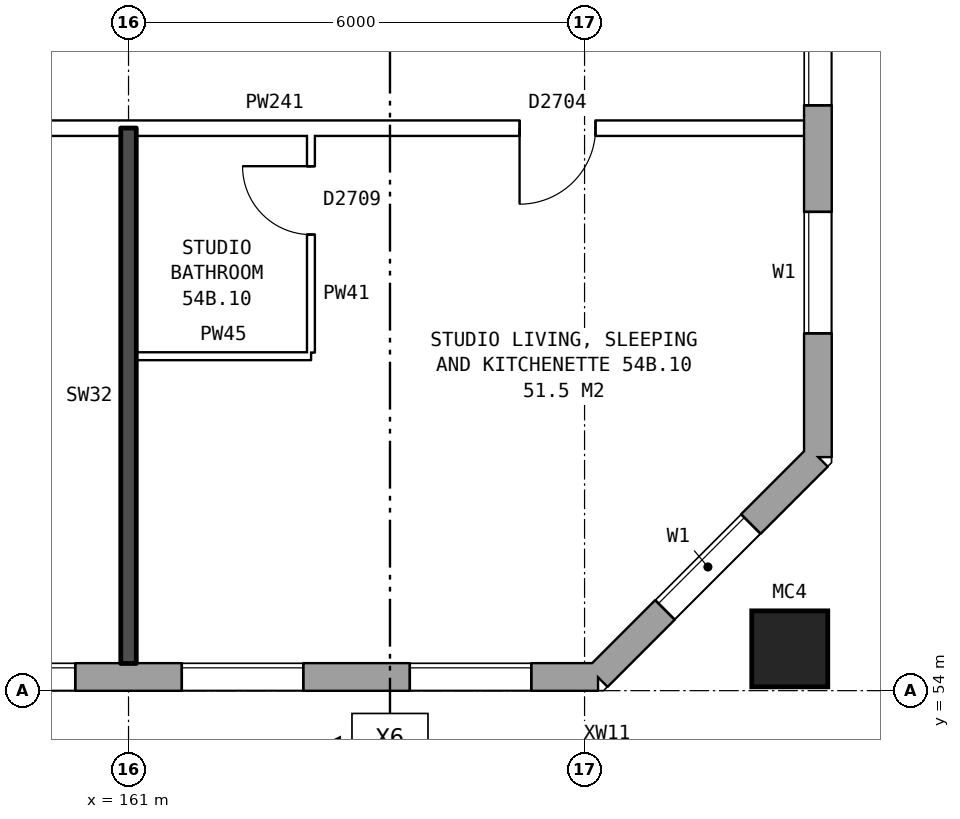
"""IFC4 building model, lengths in metres.
Left out: names, types, materials, properties, quantities, classifications, styles, units other than length and angle.
Written with IfcOpenShell. Run it as: python <this file> out.ifc"""

import sys

from ifc_helpers import new_model, si_unit, direction, frame, frame_2d, origin, origin_2d, place, context, subcontext, project, spatial, rectangle, hollow_rectangle, extrude, element, fill, save


model = new_model("IFC4")
c1 = context("Model", 3, precision=1e-05, world=origin(), true_north=direction((0.0, 1.0)))
c2 = subcontext(c1, "Body", "Model", "MODEL_VIEW")
j1 = project(units=[si_unit("LENGTHUNIT", "METRE"), si_unit("PLANEANGLEUNIT", "RADIAN")], contexts=[c1])
p1 = place(None, origin())
s1 = spatial("IfcSite", under=j1, at=p1, CompositionType="ELEMENT")
p2 = place(p1, origin())
s2 = spatial("IfcBuilding", under=s1, at=p2, CompositionType="ELEMENT")
p3 = place(p2, frame((0.0, 0.0, 191.3)))
s3 = spatial("IfcBuildingStorey", under=s2, at=p3, CompositionType="ELEMENT", Elevation=191.3)
p4 = place(p3, frame((169.7, 54.55, 0.0), z_axis=(0.0, 0.0, 1.0), x_axis=(1.0, 0.0, 0.0)))
e1 = element("IfcColumn", 1, at=p4, inside=s3, PredefinedType="COLUMN", context=c2, shape_type="SweptSolid", body=[
    extrude(hollow_rectangle(XDim=1.0, YDim=1.0, WallThickness=0.055, at=origin_2d()), origin(), (0.0, 0.0, 1.0), 3.1),
])
p5 = place(p3, frame((134.075, 54.18, 0.0), z_axis=(0.0, 0.0, 1.0), x_axis=(1.0, 0.0, 0.0)))
e2 = element("IfcWall", 2, at=p5, inside=s3, PredefinedType="STANDARD", context=c2, shape_type="SweptSolid", body=[
    extrude(rectangle(XDim=33.101, YDim=0.36, at=frame_2d((16.55, 0.0))), origin(), (0.0, 0.0, 1.0), 2.85),
])
p6 = place(p5, frame((0.625, 0.0, 0.8)))
e3 = element("IfcOpeningElement", 3, at=p6, cuts=e2, PredefinedType="OPENING", context=c2, shape_type="SweptSolid", body=[
    extrude(rectangle(XDim=1.6, YDim=1.8, at=frame_2d((0.8, 0.9))), frame((0.0, 0.19, 0.0), z_axis=(0.0, -1.0, 0.0), x_axis=(1.0, 0.0, 0.0)), (0.0, 0.0, 1.0), 0.38),
])
p7 = place(p5, frame((3.625, 0.0, 0.8)))
e4 = element("IfcOpeningElement", 4, at=p7, cuts=e2, PredefinedType="OPENING", context=c2, shape_type="SweptSolid", body=[
    extrude(rectangle(XDim=1.6, YDim=1.8, at=frame_2d((0.8, 0.9))), frame((0.0, 0.19, 0.0), z_axis=(0.0, -1.0, 0.0), x_axis=(1.0, 0.0, 0.0)), (0.0, 0.0, 1.0), 0.38),
])
p8 = place(p5, frame((6.625, 0.0, 0.8)))
e5 = element("IfcOpeningElement", 5, at=p8, cuts=e2, PredefinedType="OPENING", context=c2, shape_type="SweptSolid", body=[
    extrude(rectangle(XDim=1.6, YDim=1.8, at=frame_2d((0.8, 0.9))), frame((0.0, 0.19, 0.0), z_axis=(0.0, -1.0, 0.0), x_axis=(1.0, 0.0, 0.0)), (0.0, 0.0, 1.0), 0.38),
])
p9 = place(p5, frame((9.625, 0.0, 0.8)))
e6 = element("IfcOpeningElement", 6, at=p9, cuts=e2, PredefinedType="OPENING", context=c2, shape_type="SweptSolid", body=[
    extrude(rectangle(XDim=1.6, YDim=1.8, at=frame_2d((0.8, 0.9))), frame((0.0, 0.19, 0.0), z_axis=(0.0, -1.0, 0.0), x_axis=(1.0, 0.0, 0.0)), (0.0, 0.0, 1.0), 0.38),
])
p10 = place(p5, frame((12.625, 0.0, 0.8)))
e7 = element("IfcOpeningElement", 7, at=p10, cuts=e2, PredefinedType="OPENING", context=c2, shape_type="SweptSolid", body=[
    extrude(rectangle(XDim=1.6, YDim=1.8, at=frame_2d((0.8, 0.9))), frame((0.0, 0.19, 0.0), z_axis=(0.0, -1.0, 0.0), x_axis=(1.0, 0.0, 0.0)), (0.0, 0.0, 1.0), 0.38),
])
p11 = place(p5, frame((15.925, 0.0, 0.15)))
e8 = element("IfcOpeningElement", 8, at=p11, cuts=e2, PredefinedType="OPENING", context=c2, shape_type="SweptSolid", body=[
    extrude(rectangle(XDim=1.2, YDim=1.2, at=frame_2d((0.6, 0.6))), frame((0.0, 0.19, 0.0), z_axis=(0.0, -1.0, 0.0), x_axis=(1.0, 0.0, 0.0)), (0.0, 0.0, 1.0), 0.38),
])
p12 = place(p5, frame((18.625, 0.0, 0.8)))
e9 = element("IfcOpeningElement", 9, at=p12, cuts=e2, PredefinedType="OPENING", context=c2, shape_type="SweptSolid", body=[
    extrude(rectangle(XDim=1.6, YDim=1.8, at=frame_2d((0.8, 0.9))), frame((0.0, 0.19, 0.0), z_axis=(0.0, -1.0, 0.0), x_axis=(1.0, 0.0, 0.0)), (0.0, 0.0, 1.0), 0.38),
])
p13 = place(p5, frame((21.625, 0.0, 0.8)))
e10 = element("IfcOpeningElement", 10, at=p13, cuts=e2, PredefinedType="OPENING", context=c2, shape_type="SweptSolid", body=[
    extrude(rectangle(XDim=1.6, YDim=1.8, at=frame_2d((0.8, 0.9))), frame((0.0, 0.19, 0.0), z_axis=(0.0, -1.0, 0.0), x_axis=(1.0, 0.0, 0.0)), (0.0, 0.0, 1.0), 0.38),
])
p14 = place(p5, frame((24.625, 0.0, 0.8)))
e11 = element("IfcOpeningElement", 11, at=p14, cuts=e2, PredefinedType="OPENING", context=c2, shape_type="SweptSolid", body=[
    extrude(rectangle(XDim=1.6, YDim=1.8, at=frame_2d((0.8, 0.9))), frame((0.0, 0.19, 0.0), z_axis=(0.0, -1.0, 0.0), x_axis=(1.0, 0.0, 0.0)), (0.0, 0.0, 1.0), 0.38),
])
p15 = place(p5, frame((27.625, 0.0, 0.8)))
e12 = element("IfcOpeningElement", 12, at=p15, cuts=e2, PredefinedType="OPENING", context=c2, shape_type="SweptSolid", body=[
    extrude(rectangle(XDim=1.6, YDim=1.8, at=frame_2d((0.8, 0.9))), frame((0.0, 0.19, 0.0), z_axis=(0.0, -1.0, 0.0), x_axis=(1.0, 0.0, 0.0)), (0.0, 0.0, 1.0), 0.38),
])
p16 = place(p5, frame((30.625, 0.0, 0.8)))
e13 = element("IfcOpeningElement", 13, at=p16, cuts=e2, PredefinedType="OPENING", context=c2, shape_type="SweptSolid", body=[
    extrude(rectangle(XDim=1.6, YDim=1.8, at=frame_2d((0.8, 0.9))), frame((0.0, 0.19, 0.0), z_axis=(0.0, -1.0, 0.0), x_axis=(1.0, 0.0, 0.0)), (0.0, 0.0, 1.0), 0.38),
])
p17 = place(p3, frame((167.175, 54.18, 0.0), z_axis=(0.0, 0.0, 1.0), x_axis=(0.707106781187, 0.707106781187, 0.0)))
e14 = element("IfcWall", 14, at=p17, inside=s3, PredefinedType="STANDARD", context=c2, shape_type="SweptSolid", body=[
    extrude(rectangle(XDim=4.094, YDim=0.36, at=frame_2d((2.047, 0.0))), origin(), (0.0, 0.0, 1.0), 2.85),
])
p18 = place(p17, frame((1.247, 0.0, 0.8)))
e15 = element("IfcOpeningElement", 15, at=p18, cuts=e14, PredefinedType="OPENING", context=c2, shape_type="SweptSolid", body=[
    extrude(rectangle(XDim=1.6, YDim=1.8, at=frame_2d((0.8, 0.9))), frame((0.0, 0.19, 0.0), z_axis=(0.0, -1.0, 0.0), x_axis=(1.0, 0.0, 0.0)), (0.0, 0.0, 1.0), 0.38),
])
p19 = place(p3, frame((170.07, 57.075, 0.0), z_axis=(0.0, 0.0, 1.0), x_axis=(0.0, 1.0, 0.0)))
e16 = element("IfcWall", 16, at=p19, inside=s3, PredefinedType="STANDARD", context=c2, shape_type="SweptSolid", body=[
    extrude(rectangle(XDim=25.851, YDim=0.36, at=frame_2d((12.925, 0.0))), origin(), (0.0, 0.0, 1.0), 2.85),
])
p20 = place(p19, frame((1.625, 0.0, 0.8)))
e17 = element("IfcOpeningElement", 17, at=p20, cuts=e16, PredefinedType="OPENING", context=c2, shape_type="SweptSolid", body=[
    extrude(rectangle(XDim=1.6, YDim=1.8, at=frame_2d((0.8, 0.9))), frame((0.0, 0.19, 0.0), z_axis=(0.0, -1.0, 0.0), x_axis=(1.0, 0.0, 0.0)), (0.0, 0.0, 1.0), 0.38),
])
p21 = place(p19, frame((4.625, 0.0, 0.8)))
e18 = element("IfcOpeningElement", 18, at=p21, cuts=e16, PredefinedType="OPENING", context=c2, shape_type="SweptSolid", body=[
    extrude(rectangle(XDim=1.6, YDim=1.8, at=frame_2d((0.8, 0.9))), frame((0.0, 0.19, 0.0), z_axis=(0.0, -1.0, 0.0), x_axis=(1.0, 0.0, 0.0)), (0.0, 0.0, 1.0), 0.38),
])
p22 = place(p19, frame((7.625, 0.0, 0.8)))
e19 = element("IfcOpeningElement", 19, at=p22, cuts=e16, PredefinedType="OPENING", context=c2, shape_type="SweptSolid", body=[
    extrude(rectangle(XDim=1.6, YDim=1.8, at=frame_2d((0.8, 0.9))), frame((0.0, 0.19, 0.0), z_axis=(0.0, -1.0, 0.0), x_axis=(1.0, 0.0, 0.0)), (0.0, 0.0, 1.0), 0.38),
])
p23 = place(p19, frame((10.625, 0.0, 0.8)))
e20 = element("IfcOpeningElement", 20, at=p23, cuts=e16, PredefinedType="OPENING", context=c2, shape_type="SweptSolid", body=[
    extrude(rectangle(XDim=1.6, YDim=1.8, at=frame_2d((0.8, 0.9))), frame((0.0, 0.19, 0.0), z_axis=(0.0, -1.0, 0.0), x_axis=(1.0, 0.0, 0.0)), (0.0, 0.0, 1.0), 0.38),
])
p24 = place(p19, frame((13.625, 0.0, 0.8)))
e21 = element("IfcOpeningElement", 21, at=p24, cuts=e16, PredefinedType="OPENING", context=c2, shape_type="SweptSolid", body=[
    extrude(rectangle(XDim=1.6, YDim=1.8, at=frame_2d((0.8, 0.9))), frame((0.0, 0.19, 0.0), z_axis=(0.0, -1.0, 0.0), x_axis=(1.0, 0.0, 0.0)), (0.0, 0.0, 1.0), 0.38),
])
p25 = place(p19, frame((16.625, 0.0, 0.8)))
e22 = element("IfcOpeningElement", 22, at=p25, cuts=e16, PredefinedType="OPENING", context=c2, shape_type="SweptSolid", body=[
    extrude(rectangle(XDim=1.6, YDim=1.8, at=frame_2d((0.8, 0.9))), frame((0.0, 0.19, 0.0), z_axis=(0.0, -1.0, 0.0), x_axis=(1.0, 0.0, 0.0)), (0.0, 0.0, 1.0), 0.38),
])
p26 = place(p19, frame((19.625, 0.0, 0.8)))
e23 = element("IfcOpeningElement", 23, at=p26, cuts=e16, PredefinedType="OPENING", context=c2, shape_type="SweptSolid", body=[
    extrude(rectangle(XDim=1.6, YDim=1.8, at=frame_2d((0.8, 0.9))), frame((0.0, 0.19, 0.0), z_axis=(0.0, -1.0, 0.0), x_axis=(1.0, 0.0, 0.0)), (0.0, 0.0, 1.0), 0.38),
])
p27 = place(p19, frame((22.625, 0.0, 0.8)))
e24 = element("IfcOpeningElement", 24, at=p27, cuts=e16, PredefinedType="OPENING", context=c2, shape_type="SweptSolid", body=[
    extrude(rectangle(XDim=1.6, YDim=1.8, at=frame_2d((0.8, 0.9))), frame((0.0, 0.19, 0.0), z_axis=(0.0, -1.0, 0.0), x_axis=(1.0, 0.0, 0.0)), (0.0, 0.0, 1.0), 0.38),
])
p28 = place(p3, frame((161.1, 58.4, 0.0), z_axis=(0.0, 0.0, 1.0), x_axis=(1.0, 0.0, 0.0)))
e25 = element("IfcWall", 25, at=p28, inside=s3, PredefinedType="PARTITIONING", context=c2, shape_type="SweptSolid", body=[
    extrude(rectangle(XDim=2.3, YDim=0.1, at=frame_2d((1.15, 0.0))), origin(), (0.0, 0.0, 1.0), 2.85),
])
p29 = place(p3, frame((155.1, 61.4, 0.0), z_axis=(0.0, 0.0, 1.0), x_axis=(1.0, 0.0, 0.0)))
e26 = element("IfcWall", 26, at=p29, inside=s3, PredefinedType="PARTITIONING", context=c2, shape_type="SweptSolid", body=[
    extrude(rectangle(XDim=14.79, YDim=0.2, at=frame_2d((7.395, 0.0))), origin(), (0.0, 0.0, 1.0), 2.85),
])
p30 = place(p29, frame((3.6, 0.0, 0.0)))
e27 = element("IfcOpeningElement", 27, at=p30, cuts=e26, PredefinedType="OPENING", context=c2, shape_type="SweptSolid", body=[
    extrude(rectangle(XDim=1.0, YDim=2.1, at=frame_2d((0.5, 1.05))), frame((0.0, 0.11, 0.0), z_axis=(0.0, -1.0, 0.0), x_axis=(1.0, 0.0, 0.0)), (0.0, 0.0, 1.0), 0.22),
])
p31 = place(p29, frame((11.045, 0.0, 0.0)))
e28 = element("IfcOpeningElement", 28, at=p31, cuts=e26, PredefinedType="OPENING", context=c2, shape_type="SweptSolid", body=[
    extrude(rectangle(XDim=1.0, YDim=2.1, at=frame_2d((0.5, 1.05))), frame((0.0, 0.11, 0.0), z_axis=(0.0, -1.0, 0.0), x_axis=(1.0, 0.0, 0.0)), (0.0, 0.0, 1.0), 0.22),
])
p32 = place(p3, frame((161.0, 54.36, 0.0), z_axis=(0.0, 0.0, 1.0), x_axis=(0.0, 1.0, 0.0)))
e29 = element("IfcWall", 29, at=p32, inside=s3, PredefinedType="SOLIDWALL", context=c2, shape_type="SweptSolid", body=[
    extrude(rectangle(XDim=7.04, YDim=0.2, at=frame_2d((3.52, 0.0))), origin(), (0.0, 0.0, 1.0), 2.85),
])
p33 = place(p3, frame((163.4, 58.45, 0.0), z_axis=(0.0, 0.0, 1.0), x_axis=(0.0, 1.0, 0.0)))
e30 = element("IfcWall", 30, at=p33, inside=s3, PredefinedType="PARTITIONING", context=c2, shape_type="SweptSolid", body=[
    extrude(rectangle(XDim=2.85, YDim=0.1, at=frame_2d((1.425, 0.0))), origin(), (0.0, 0.0, 1.0), 2.85),
])
p34 = place(p33, frame((1.55, 0.0, 0.0)))
e31 = element("IfcOpeningElement", 31, at=p34, cuts=e30, PredefinedType="OPENING", context=c2, shape_type="SweptSolid", body=[
    extrude(rectangle(XDim=0.9, YDim=2.1, at=frame_2d((0.45, 1.05))), frame((0.0, 0.06, 0.0), z_axis=(0.0, -1.0, 0.0), x_axis=(1.0, 0.0, 0.0)), (0.0, 0.0, 1.0), 0.12),
])
p35 = place(p14, origin())
e32 = element("IfcWindow", 32, at=p35, inside=s3, PartitioningType="SINGLE_PANEL", PredefinedType="WINDOW", context=c2, shape_type="SweptSolid", body=[
    extrude(rectangle(XDim=1.6, YDim=1.8, at=frame_2d((0.8, 0.9))), frame((0.0, 0.15, 0.0), z_axis=(0.0, -1.0, 0.0), x_axis=(1.0, 0.0, 0.0)), (0.0, 0.0, 1.0), 0.06),
])
fill(e11, e32)
p36 = place(p15, origin())
e33 = element("IfcWindow", 33, at=p36, inside=s3, PartitioningType="SINGLE_PANEL", PredefinedType="WINDOW", context=c2, shape_type="SweptSolid", body=[
    extrude(rectangle(XDim=1.6, YDim=1.8, at=frame_2d((0.8, 0.9))), frame((0.0, 0.15, 0.0), z_axis=(0.0, -1.0, 0.0), x_axis=(1.0, 0.0, 0.0)), (0.0, 0.0, 1.0), 0.06),
])
fill(e12, e33)
p37 = place(p16, origin())
e34 = element("IfcWindow", 34, at=p37, inside=s3, PartitioningType="SINGLE_PANEL", PredefinedType="WINDOW", context=c2, shape_type="SweptSolid", body=[
    extrude(rectangle(XDim=1.6, YDim=1.8, at=frame_2d((0.8, 0.9))), frame((0.0, 0.15, 0.0), z_axis=(0.0, -1.0, 0.0), x_axis=(1.0, 0.0, 0.0)), (0.0, 0.0, 1.0), 0.06),
])
fill(e13, e34)
p38 = place(p18, origin())
e35 = element("IfcWindow", 35, at=p38, inside=s3, PartitioningType="SINGLE_PANEL", PredefinedType="WINDOW", context=c2, shape_type="SweptSolid", body=[
    extrude(rectangle(XDim=1.6, YDim=1.8, at=frame_2d((0.8, 0.9))), frame((0.0, 0.15, 0.0), z_axis=(0.0, -1.0, 0.0), x_axis=(1.0, 0.0, 0.0)), (0.0, 0.0, 1.0), 0.06),
])
fill(e15, e35)
p39 = place(p20, origin())
e36 = element("IfcWindow", 36, at=p39, inside=s3, PartitioningType="SINGLE_PANEL", PredefinedType="WINDOW", context=c2, shape_type="SweptSolid", body=[
    extrude(rectangle(XDim=1.6, YDim=1.8, at=frame_2d((0.8, 0.9))), frame((0.0, 0.15, 0.0), z_axis=(0.0, -1.0, 0.0), x_axis=(1.0, 0.0, 0.0)), (0.0, 0.0, 1.0), 0.06),
])
fill(e17, e36)
p40 = place(p21, origin())
e37 = element("IfcWindow", 37, at=p40, inside=s3, PartitioningType="SINGLE_PANEL", PredefinedType="WINDOW", context=c2, shape_type="SweptSolid", body=[
    extrude(rectangle(XDim=1.6, YDim=1.8, at=frame_2d((0.8, 0.9))), frame((0.0, 0.15, 0.0), z_axis=(0.0, -1.0, 0.0), x_axis=(1.0, 0.0, 0.0)), (0.0, 0.0, 1.0), 0.06),
])
fill(e18, e37)
p41 = place(p31, frame((1.0, 0.0, 0.0), z_axis=(0.0, 0.0, 1.0), x_axis=(-1.0, 0.0, 0.0)))
e38 = element("IfcDoor", 38, at=p41, inside=s3, OperationType="SINGLE_SWING_RIGHT", PredefinedType="DOOR", context=c2, shape_type="SweptSolid", body=[
    extrude(rectangle(XDim=1.0, YDim=2.1, at=frame_2d((0.5, 1.05))), frame((0.0, 0.025, 0.0), z_axis=(0.0, -1.0, 0.0), x_axis=(1.0, 0.0, 0.0)), (0.0, 0.0, 1.0), 0.05),
])
fill(e28, e38)
p42 = place(p34, origin())
e39 = element("IfcDoor", 39, at=p42, inside=s3, OperationType="SINGLE_SWING_RIGHT", PredefinedType="DOOR", context=c2, shape_type="SweptSolid", body=[
    extrude(rectangle(XDim=0.9, YDim=2.1, at=frame_2d((0.45, 1.05))), frame((0.0, 0.025, 0.0), z_axis=(0.0, -1.0, 0.0), x_axis=(1.0, 0.0, 0.0)), (0.0, 0.0, 1.0), 0.05),
])
fill(e31, e39)
save(model, sys.argv[1])
